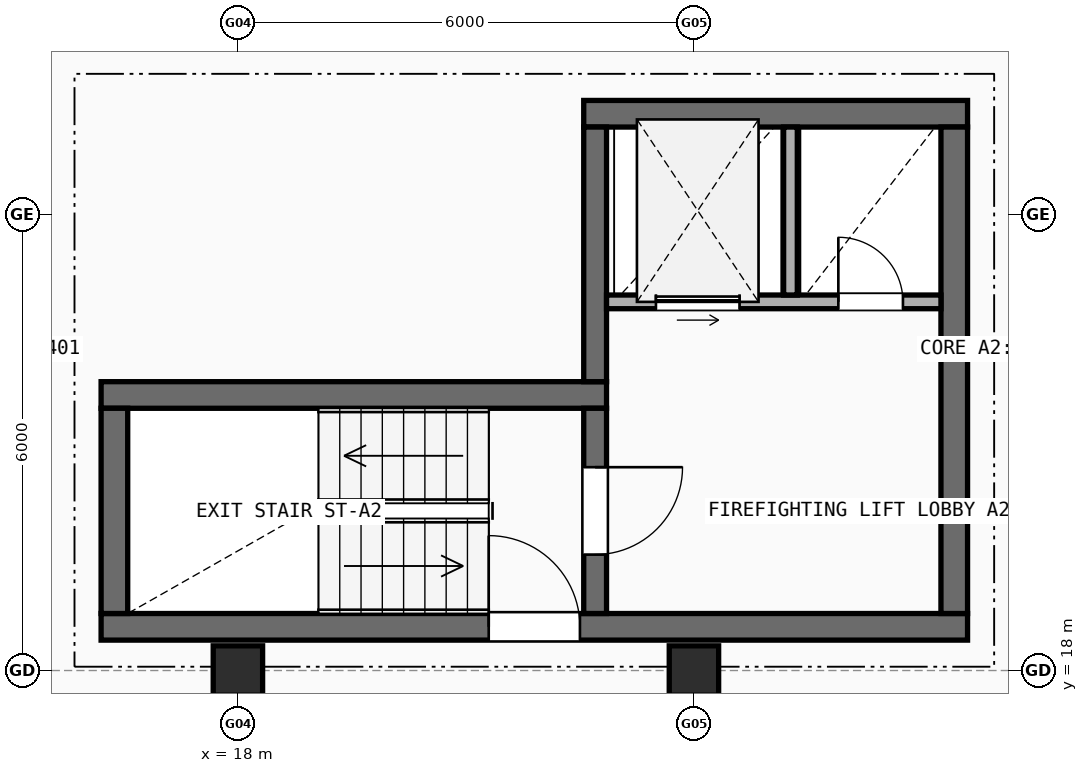
"""IFC4 building model, lengths in metres.
Left out: names, types, materials, properties, quantities, classifications, styles, units other than length and angle.
Written with IfcOpenShell. Run it as: python <this file> out.ifc"""

import sys

from ifc_helpers import new_model, si_unit, direction, frame, frame_2d, origin, origin_2d, place, context, subcontext, project, spatial, rectangle, extrude, element, fill, save


model = new_model("IFC4")
c1 = context("Model", 3, precision=1e-05, world=origin(), true_north=direction((0.0, 1.0)))
c2 = subcontext(c1, "Body", "Model", "MODEL_VIEW")
j1 = project(units=[si_unit("LENGTHUNIT", "METRE"), si_unit("PLANEANGLEUNIT", "RADIAN")], contexts=[c1])
p1 = place(None, origin())
s1 = spatial("IfcSite", under=j1, at=p1, CompositionType="ELEMENT")
p2 = place(p1, origin())
s2 = spatial("IfcBuilding", under=s1, at=p2, CompositionType="ELEMENT")
p3 = place(p2, frame((0.0, 0.0, 10.9)))
s3 = spatial("IfcBuildingStorey", under=s2, at=p3, CompositionType="ELEMENT", Elevation=10.9)
for number, where, z_axis, x_axis in (
    (1, (18.0, 18.0, 0.0), (0.0, 0.0, 1.0), (1.0, 0.0, 0.0)),
    (2, (24.0, 18.0, 0.0), (0.0, 0.0, 1.0), (1.0, 0.0, 0.0)),
):
    element("IfcColumn", number, at=place(p3, frame(where, z_axis=z_axis, x_axis=x_axis)), inside=s3, PredefinedType="COLUMN", context=c2, shape_type="SweptSolid", body=[
        extrude(rectangle(XDim=0.65, YDim=0.65, at=origin_2d()), origin(), (0.0, 0.0, 1.0), 2.96),
    ])
p4 = place(p3, frame((16.2, 18.575, 0.0), z_axis=(0.0, 0.0, 1.0), x_axis=(1.0, 0.0, 0.0)))
e3 = element("IfcWall", 3, at=p4, inside=s3, PredefinedType="SHEAR", context=c2, shape_type="SweptSolid", body=[
    extrude(rectangle(XDim=11.4, YDim=0.35, at=frame_2d((5.7, 0.0))), origin(), (0.0, 0.0, 1.0), 2.96),
])
p5 = place(p4, frame((5.1, 0.0, 0.0)))
e4 = element("IfcOpeningElement", 4, at=p5, cuts=e3, PredefinedType="OPENING", context=c2, shape_type="SweptSolid", body=[
    extrude(rectangle(XDim=1.2, YDim=2.15, at=frame_2d((0.6, 1.075))), frame((0.0, 0.185, 0.0), z_axis=(0.0, -1.0, 0.0), x_axis=(1.0, 0.0, 0.0)), (0.0, 0.0, 1.0), 0.37),
])
p6 = place(p3, frame((22.85, 21.625, 0.0), z_axis=(0.0, 0.0, 1.0), x_axis=(-1.0, 0.0, 0.0)))
e5 = element("IfcWall", 5, at=p6, inside=s3, PredefinedType="SHEAR", context=c2, shape_type="SweptSolid", body=[
    extrude(rectangle(XDim=6.65, YDim=0.35, at=frame_2d((3.325, 0.0))), origin(), (0.0, 0.0, 1.0), 2.96),
])
p7 = place(p3, frame((16.375, 21.45, 0.0), z_axis=(0.0, 0.0, 1.0), x_axis=(0.0, -1.0, 0.0)))
e6 = element("IfcWall", 6, at=p7, inside=s3, PredefinedType="SHEAR", context=c2, shape_type="SweptSolid", body=[
    extrude(rectangle(XDim=2.7, YDim=0.35, at=frame_2d((1.35, 0.0))), origin(), (0.0, 0.0, 1.0), 2.96),
])
p8 = place(p3, frame((22.7, 18.75, 0.0), z_axis=(0.0, 0.0, 1.0), x_axis=(0.0, 1.0, 0.0)))
e7 = element("IfcWall", 7, at=p8, inside=s3, PredefinedType="SHEAR", context=c2, shape_type="SweptSolid", body=[
    extrude(rectangle(XDim=2.7, YDim=0.3, at=frame_2d((1.35, 0.0))), origin(), (0.0, 0.0, 1.0), 2.96),
])
p9 = place(p8, frame((0.775, 0.0, 0.0)))
e8 = element("IfcOpeningElement", 8, at=p9, cuts=e7, PredefinedType="OPENING", context=c2, shape_type="SweptSolid", body=[
    extrude(rectangle(XDim=1.15, YDim=2.15, at=frame_2d((0.575, 1.075))), frame((0.0, 0.16, 0.0), z_axis=(0.0, -1.0, 0.0), x_axis=(1.0, 0.0, 0.0)), (0.0, 0.0, 1.0), 0.32),
])
p10 = place(p3, frame((27.6, 25.325, 0.0), z_axis=(0.0, 0.0, 1.0), x_axis=(-1.0, 0.0, 0.0)))
e9 = element("IfcWall", 9, at=p10, inside=s3, PredefinedType="SHEAR", context=c2, shape_type="SweptSolid", body=[
    extrude(rectangle(XDim=5.05, YDim=0.35, at=frame_2d((2.525, 0.0))), origin(), (0.0, 0.0, 1.0), 2.96),
])
p11 = place(p3, frame((27.425, 18.75, 0.0), z_axis=(0.0, 0.0, 1.0), x_axis=(0.0, 1.0, 0.0)))
e10 = element("IfcWall", 10, at=p11, inside=s3, PredefinedType="SHEAR", context=c2, shape_type="SweptSolid", body=[
    extrude(rectangle(XDim=6.4, YDim=0.35, at=frame_2d((3.2, 0.0))), origin(), (0.0, 0.0, 1.0), 2.96),
])
p12 = place(p3, frame((22.7, 21.8, 0.0), z_axis=(0.0, 0.0, 1.0), x_axis=(0.0, 1.0, 0.0)))
e11 = element("IfcWall", 11, at=p12, inside=s3, PredefinedType="SHEAR", context=c2, shape_type="SweptSolid", body=[
    extrude(rectangle(XDim=3.35, YDim=0.3, at=frame_2d((1.675, 0.0))), origin(), (0.0, 0.0, 1.0), 2.96),
])
p13 = place(p3, frame((22.85, 22.85, 0.0), z_axis=(0.0, 0.0, 1.0), x_axis=(1.0, 0.0, 0.0)))
e12 = element("IfcWall", 12, at=p13, inside=s3, PredefinedType="SOLIDWALL", context=c2, shape_type="SweptSolid", body=[
    extrude(rectangle(XDim=4.4, YDim=0.18, at=frame_2d((2.2, 0.0))), origin(), (0.0, 0.0, 1.0), 2.96),
])
p14 = place(p13, frame((0.65, 0.0, 0.0)))
e13 = element("IfcOpeningElement", 13, at=p14, cuts=e12, PredefinedType="OPENING", context=c2, shape_type="SweptSolid", body=[
    extrude(rectangle(XDim=1.1, YDim=2.15, at=frame_2d((0.55, 1.075))), frame((0.0, 0.1, 0.0), z_axis=(0.0, -1.0, 0.0), x_axis=(1.0, 0.0, 0.0)), (0.0, 0.0, 1.0), 0.2),
])
p15 = place(p13, frame((3.05, 0.0, 0.0)))
e14 = element("IfcOpeningElement", 14, at=p15, cuts=e12, PredefinedType="OPENING", context=c2, shape_type="SweptSolid", body=[
    extrude(rectangle(XDim=0.85, YDim=2.1, at=frame_2d((0.425, 1.05))), frame((0.0, 0.1, 0.0), z_axis=(0.0, -1.0, 0.0), x_axis=(1.0, 0.0, 0.0)), (0.0, 0.0, 1.0), 0.2),
])
p16 = place(p3, frame((25.27, 22.94, 0.0), z_axis=(0.0, 0.0, 1.0), x_axis=(0.0, 1.0, 0.0)))
e15 = element("IfcWall", 15, at=p16, inside=s3, PredefinedType="SOLIDWALL", context=c2, shape_type="SweptSolid", body=[
    extrude(rectangle(XDim=2.21, YDim=0.18, at=frame_2d((1.105, 0.0))), origin(), (0.0, 0.0, 1.0), 2.96),
])
p17 = place(p5, origin())
e16 = element("IfcDoor", 16, at=p17, inside=s3, OperationType="SINGLE_SWING_LEFT", PredefinedType="DOOR", context=c2, shape_type="SweptSolid", body=[
    extrude(rectangle(XDim=1.2, YDim=2.15, at=frame_2d((0.6, 1.075))), frame((0.0, 0.025, 0.0), z_axis=(0.0, -1.0, 0.0), x_axis=(1.0, 0.0, 0.0)), (0.0, 0.0, 1.0), 0.05),
])
fill(e4, e16)
p18 = place(p9, origin())
e17 = element("IfcDoor", 17, at=p18, inside=s3, OperationType="SINGLE_SWING_RIGHT", PredefinedType="DOOR", context=c2, shape_type="SweptSolid", body=[
    extrude(rectangle(XDim=1.15, YDim=2.15, at=frame_2d((0.575, 1.075))), frame((0.0, 0.025, 0.0), z_axis=(0.0, -1.0, 0.0), x_axis=(1.0, 0.0, 0.0)), (0.0, 0.0, 1.0), 0.05),
])
fill(e8, e17)
p19 = place(p14, origin())
e18 = element("IfcDoor", 18, at=p19, inside=s3, OperationType="SLIDING_TO_LEFT", PredefinedType="DOOR", context=c2, shape_type="SweptSolid", body=[
    extrude(rectangle(XDim=1.1, YDim=2.15, at=frame_2d((0.55, 1.075))), frame((0.0, 0.025, 0.0), z_axis=(0.0, -1.0, 0.0), x_axis=(1.0, 0.0, 0.0)), (0.0, 0.0, 1.0), 0.05),
])
fill(e13, e18)
p20 = place(p15, frame((0.85, 0.0, 0.0), z_axis=(0.0, 0.0, 1.0), x_axis=(-1.0, 0.0, 0.0)))
e19 = element("IfcDoor", 19, at=p20, inside=s3, OperationType="SINGLE_SWING_LEFT", PredefinedType="DOOR", context=c2, shape_type="SweptSolid", body=[
    extrude(rectangle(XDim=0.85, YDim=2.1, at=frame_2d((0.425, 1.05))), frame((0.0, 0.025, 0.0), z_axis=(0.0, -1.0, 0.0), x_axis=(1.0, 0.0, 0.0)), (0.0, 0.0, 1.0), 0.05),
])
fill(e14, e19)
save(model, sys.argv[1])
